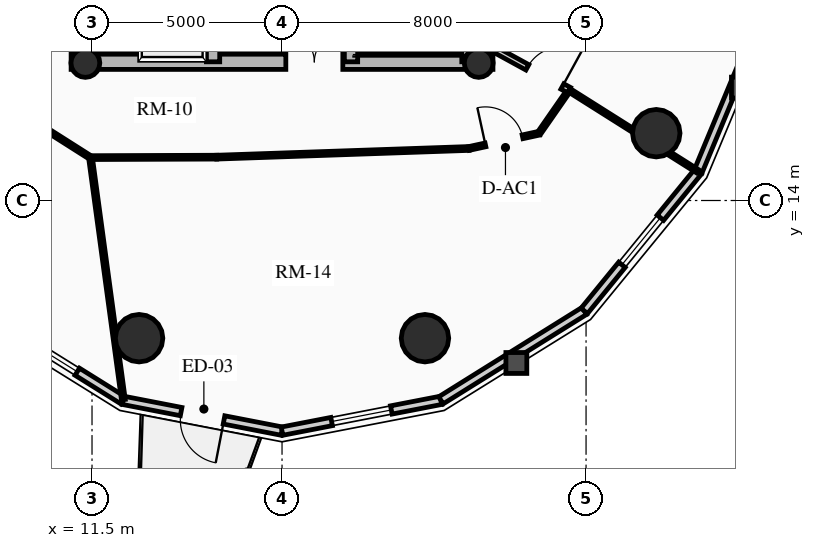
"""IFC4 building model, lengths in metres.
Left out: names, types, materials, properties, quantities, classifications, styles, units other than length and angle.
Written with IfcOpenShell. Run it as: python <this file> out.ifc"""

import sys

from ifc_helpers import new_model, si_unit, direction, frame, frame_2d, origin, origin_2d, place, context, subcontext, project, spatial, rectangle, circle, hollow_circle, extrude, source, transform, mapped, element, fill, save


model = new_model("IFC4")
c1 = context("Model", 3, precision=1e-05, world=origin(), true_north=direction((0.0, 1.0)))
c2 = subcontext(c1, "Body", "Model", "MODEL_VIEW")
j1 = project(units=[si_unit("LENGTHUNIT", "METRE"), si_unit("PLANEANGLEUNIT", "RADIAN")], contexts=[c1])
p1 = place(None, origin())
s1 = spatial("IfcSite", under=j1, at=p1, CompositionType="ELEMENT")
p2 = place(p1, origin())
s2 = spatial("IfcBuilding", under=s1, at=p2, CompositionType="ELEMENT")
p3 = place(p2, frame((0.0, 0.0, 189.43)))
s3 = spatial("IfcBuildingStorey", under=s2, at=p3, CompositionType="ELEMENT", Elevation=189.43)
for number, where, z_axis, x_axis in (
    (1, (11.15, 17.45, 0.0), (0.0, 0.0, 1.0), (0.0, 1.0, 0.0)),
    (2, (21.85, 17.45, 0.0), (0.0, 0.0, 1.0), (0.0, 1.0, 0.0)),
):
    element("IfcWall", number, at=place(p3, frame(where, z_axis=z_axis, x_axis=x_axis)), inside=s3, PredefinedType="SHEAR", context=c2, shape_type="SweptSolid", body=[
        extrude(rectangle(XDim=14.1, YDim=0.4, at=frame_2d((7.05, 0.0))), origin(), (0.0, 0.0, 1.0), 2.91),
    ])
p4 = place(p3, frame((11.15, 17.65, 0.0), z_axis=(0.0, 0.0, 1.0), x_axis=(1.0, 0.0, 0.0)))
e3 = element("IfcWall", 3, at=p4, inside=s3, PredefinedType="SHEAR", context=c2, shape_type="SweptSolid", body=[
    extrude(rectangle(XDim=10.7, YDim=0.4, at=frame_2d((5.35, 0.0))), origin(), (0.0, 0.0, 1.0), 2.91),
])
m1 = source(origin(), c2, "Body", "SweptSolid", [
    extrude(rectangle(XDim=1.5, YDim=2.02, at=frame_2d((0.75, 1.01))), frame((0.0, 0.21, 0.0), z_axis=(0.0, -1.0, 0.0), x_axis=(1.0, 0.0, 0.0)), (0.0, 0.0, 1.0), 0.42),
])
p5 = place(p4, frame((5.45, 0.0, 0.0)))
e4 = element("IfcOpeningElement", 4, at=p5, cuts=e3, PredefinedType="OPENING", context=c2, shape_type="MappedRepresentation", body=[
    mapped(m1, transform((0.0, 0.0, 0.0), x_axis=(1.0, 0.0, 0.0), y_axis=(0.0, 1.0, 0.0), z_axis=(0.0, 0.0, 1.0), scale=1.0)),
])
p6 = place(p3, frame((14.685, 17.65, 0.0), z_axis=(0.0, 0.0, 1.0), x_axis=(0.0, 1.0, 0.0)))
e5 = element("IfcWall", 5, at=p6, inside=s3, PredefinedType="SHEAR", context=c2, shape_type="SweptSolid", body=[
    extrude(rectangle(XDim=13.7, YDim=0.35, at=frame_2d((6.85, 0.0))), origin(), (0.0, 0.0, 1.0), 2.91),
])
m2 = source(origin(), c2, "Body", "SweptSolid", [
    extrude(rectangle(XDim=1.1, YDim=2.015, at=frame_2d((0.55, 1.007))), frame((0.0, 0.185, 0.0), z_axis=(0.0, -1.0, 0.0), x_axis=(1.0, 0.0, 0.0)), (0.0, 0.0, 1.0), 0.37),
])
p7 = place(p6, frame((4.85, 0.0, 0.0)))
e6 = element("IfcOpeningElement", 6, at=p7, cuts=e5, PredefinedType="OPENING", context=c2, shape_type="MappedRepresentation", body=[
    mapped(m2, transform((0.0, 0.0, 0.0), x_axis=(1.0, 0.0, 0.0), y_axis=(0.0, 1.0, 0.0), z_axis=(0.0, 0.0, 1.0), scale=1.0)),
])
p8 = place(p6, frame((0.625, 0.0, 0.0)))
e7 = element("IfcOpeningElement", 7, at=p8, cuts=e5, PredefinedType="OPENING", context=c2, shape_type="MappedRepresentation", body=[
    mapped(m2, transform((0.0, 0.0, 0.0), x_axis=(1.0, 0.0, 0.0), y_axis=(0.0, 1.0, 0.0), z_axis=(0.0, 0.0, 1.0), scale=1.0)),
])
p9 = place(p6, frame((2.625, 0.0, 0.0)))
e8 = element("IfcOpeningElement", 8, at=p9, cuts=e5, PredefinedType="OPENING", context=c2, shape_type="MappedRepresentation", body=[
    mapped(m2, transform((0.0, 0.0, 0.0), x_axis=(1.0, 0.0, 0.0), y_axis=(0.0, 1.0, 0.0), z_axis=(0.0, 0.0, 1.0), scale=1.0)),
])
m3 = source(origin(), c2, "Body", "SweptSolid", [
    extrude(rectangle(XDim=1.15, YDim=2.02, at=frame_2d((0.575, 1.01))), frame((0.0, 0.185, 0.0), z_axis=(0.0, -1.0, 0.0), x_axis=(1.0, 0.0, 0.0)), (0.0, 0.0, 1.0), 0.37),
])
p10 = place(p6, frame((7.27, 0.0, 0.0)))
e9 = element("IfcOpeningElement", 9, at=p10, cuts=e5, PredefinedType="OPENING", context=c2, shape_type="MappedRepresentation", body=[
    mapped(m3, transform((0.0, 0.0, 0.0), x_axis=(1.0, 0.0, 0.0), y_axis=(0.0, 1.0, 0.0), z_axis=(0.0, 0.0, 1.0), scale=1.0)),
])
p11 = place(p3, frame((18.315, 17.65, 0.0), z_axis=(0.0, 0.0, 1.0), x_axis=(0.0, 1.0, 0.0)))
e10 = element("IfcWall", 10, at=p11, inside=s3, PredefinedType="SHEAR", context=c2, shape_type="SweptSolid", body=[
    extrude(rectangle(XDim=9.6, YDim=0.35, at=frame_2d((4.8, 0.0))), origin(), (0.0, 0.0, 1.0), 2.91),
])
p12 = place(p11, frame((5.28, 0.0, 0.0)))
e11 = element("IfcOpeningElement", 11, at=p12, cuts=e10, PredefinedType="OPENING", context=c2, shape_type="MappedRepresentation", body=[
    mapped(m3, transform((0.0, 0.0, 0.0), x_axis=(1.0, 0.0, 0.0), y_axis=(0.0, 1.0, 0.0), z_axis=(0.0, 0.0, 1.0), scale=1.0)),
])
p13 = place(p3, frame((21.405, 17.65, 0.0), z_axis=(0.0, 0.0, 1.0), x_axis=(0.0, 1.0, 0.0)))
e12 = element("IfcWall", 12, at=p13, inside=s3, PredefinedType="SHEAR", context=c2, shape_type="SweptSolid", body=[
    extrude(rectangle(XDim=6.695, YDim=0.35, at=frame_2d((3.348, 0.0))), origin(), (0.0, 0.0, 1.0), 2.91),
])
for number, where, z_axis, x_axis in (
    (13, (11.325, 17.62, 0.0), (0.0, 0.0, 1.0), (1.0, 0.0, 0.0)),
    (14, (21.675, 17.62, 0.0), (0.0, 0.0, 1.0), (1.0, 0.0, 0.0)),
):
    element("IfcColumn", number, at=place(p3, frame(where, z_axis=z_axis, x_axis=x_axis)), inside=s3, PredefinedType="COLUMN", context=c2, shape_type="SweptSolid", body=[
        extrude(hollow_circle(Radius=0.38, WallThickness=0.032, at=origin_2d()), origin(), (0.0, 0.0, 1.0), 2.91),
    ])
for number, where, z_axis, x_axis in (
    (15, (12.739, 10.377, 0.0), (0.0, 0.0, 1.0), (1.0, 0.0, 0.0)),
    (16, (20.261, 10.377, 0.0), (0.0, 0.0, 1.0), (1.0, 0.0, 0.0)),
    (17, (26.347, 15.771, 0.0), (0.0, 0.0, 1.0), (1.0, 0.0, 0.0)),
):
    element("IfcColumn", number, at=place(p3, frame(where, z_axis=z_axis, x_axis=x_axis)), inside=s3, PredefinedType="USERDEFINED", context=c2, shape_type="SweptSolid", body=[
        extrude(circle(Radius=0.625, at=origin_2d()), origin(), (0.0, 0.0, 1.0), 2.91),
    ])
p14 = place(p3, frame((12.319, 8.741, 0.0), z_axis=(0.0, 0.0, 1.0), x_axis=(-0.848399108042, 0.529357113368, 0.0)))
e18 = element("IfcWall", 18, at=p14, inside=s3, PredefinedType="SOLIDWALL", context=c2, shape_type="SweptSolid", body=[
    extrude(rectangle(XDim=4.446, YDim=0.22, at=frame_2d((2.223, 0.0))), origin(), (0.0, 0.0, 1.0), 2.125),
])
m4 = source(origin(), c2, "Body", "SweptSolid", [
    extrude(rectangle(XDim=1.6, YDim=1.3, at=frame_2d((0.8, 0.65))), frame((0.0, 0.12, 0.0), z_axis=(0.0, -1.0, 0.0), x_axis=(1.0, 0.0, 0.0)), (0.0, 0.0, 1.0), 0.24),
])
p15 = place(p14, frame((1.423, 0.0, 0.65)))
e19 = element("IfcOpeningElement", 19, at=p15, cuts=e18, PredefinedType="OPENING", context=c2, shape_type="MappedRepresentation", body=[
    mapped(m4, transform((0.0, 0.0, 0.0), x_axis=(1.0, 0.0, 0.0), y_axis=(0.0, 1.0, 0.0), z_axis=(0.0, 0.0, 1.0), scale=1.0)),
])
p16 = place(p3, frame((16.5, 7.93, 0.0), z_axis=(0.0, 0.0, 1.0), x_axis=(-0.981703883443, 0.190413983815, 0.0)))
e20 = element("IfcWall", 20, at=p16, inside=s3, PredefinedType="SOLIDWALL", context=c2, shape_type="SweptSolid", body=[
    extrude(rectangle(XDim=4.259, YDim=0.22, at=frame_2d((2.13, 0.0))), origin(), (0.0, 0.0, 1.0), 2.125),
])
m5 = source(origin(), c2, "Body", "SweptSolid", [
    extrude(rectangle(XDim=1.15, YDim=2.005, at=frame_2d((0.575, 1.002))), frame((0.0, 0.12, 0.0), z_axis=(0.0, -1.0, 0.0), x_axis=(1.0, 0.0, 0.0)), (0.0, 0.0, 1.0), 0.24),
])
p17 = place(p16, frame((1.555, 0.0, 0.0)))
e21 = element("IfcOpeningElement", 21, at=p17, cuts=e20, PredefinedType="OPENING", context=c2, shape_type="MappedRepresentation", body=[
    mapped(m5, transform((0.0, 0.0, 0.0), x_axis=(1.0, 0.0, 0.0), y_axis=(0.0, 1.0, 0.0), z_axis=(0.0, 0.0, 1.0), scale=1.0)),
])
p18 = place(p3, frame((20.681, 8.741, 0.0), z_axis=(0.0, 0.0, 1.0), x_axis=(-0.981703883443, -0.190413983815, 0.0)))
e22 = element("IfcWall", 22, at=p18, inside=s3, PredefinedType="SOLIDWALL", context=c2, shape_type="SweptSolid", body=[
    extrude(rectangle(XDim=4.259, YDim=0.22, at=frame_2d((2.13, 0.0))), origin(), (0.0, 0.0, 1.0), 2.125),
])
p19 = place(p18, frame((1.33, 0.0, 0.65)))
e23 = element("IfcOpeningElement", 23, at=p19, cuts=e22, PredefinedType="OPENING", context=c2, shape_type="MappedRepresentation", body=[
    mapped(m4, transform((0.0, 0.0, 0.0), x_axis=(1.0, 0.0, 0.0), y_axis=(0.0, 1.0, 0.0), z_axis=(0.0, 0.0, 1.0), scale=1.0)),
])
p20 = place(p3, frame((24.453, 11.094, 0.0), z_axis=(0.0, 0.0, 1.0), x_axis=(-0.848399108042, -0.529357113368, 0.0)))
e24 = element("IfcWall", 24, at=p20, inside=s3, PredefinedType="SOLIDWALL", context=c2, shape_type="SweptSolid", body=[
    extrude(rectangle(XDim=4.446, YDim=0.22, at=frame_2d((2.223, 0.0))), origin(), (0.0, 0.0, 1.0), 2.125),
])
p21 = place(p3, frame((27.447, 14.76, 0.0), z_axis=(0.0, 0.0, 1.0), x_axis=(-0.632470615287, -0.774584353572, 0.0)))
e25 = element("IfcWall", 25, at=p21, inside=s3, PredefinedType="SOLIDWALL", context=c2, shape_type="SweptSolid", body=[
    extrude(rectangle(XDim=4.733, YDim=0.22, at=frame_2d((2.366, 0.0))), origin(), (0.0, 0.0, 1.0), 2.125),
])
p22 = place(p21, frame((1.566, 0.0, 0.65)))
e26 = element("IfcOpeningElement", 26, at=p22, cuts=e25, PredefinedType="OPENING", context=c2, shape_type="MappedRepresentation", body=[
    mapped(m4, transform((0.0, 0.0, 0.0), x_axis=(1.0, 0.0, 0.0), y_axis=(0.0, 1.0, 0.0), z_axis=(0.0, 0.0, 1.0), scale=1.0)),
])
p23 = place(p3, frame((29.369, 19.38, 0.0), z_axis=(0.0, 0.0, 1.0), x_axis=(-0.384144094086, -0.923273152961, 0.0)))
e27 = element("IfcWall", 27, at=p23, inside=s3, PredefinedType="SOLIDWALL", context=c2, shape_type="SweptSolid", body=[
    extrude(rectangle(XDim=5.003, YDim=0.22, at=frame_2d((2.501, 0.0))), origin(), (0.0, 0.0, 1.0), 2.125),
])
p24 = place(p3, frame((10.115, 15.983, 0.0), z_axis=(0.0, 0.0, 1.0), x_axis=(0.843995849351, -0.536349705209, 0.0)))
e28 = element("IfcWall", 28, at=p24, inside=s3, PredefinedType="MOVABLE", context=c2, shape_type="SweptSolid", body=[
    extrude(rectangle(XDim=1.593, YDim=0.1, at=frame_2d((0.796, 0.0))), origin(), (0.0, 0.0, 1.0), 2.125),
])
p25 = place(p3, frame((11.46, 15.129, 0.0), z_axis=(0.0, 0.0, 1.0), x_axis=(0.999993513287, 0.003601858435, 0.0)))
e29 = element("IfcWall", 29, at=p25, inside=s3, PredefinedType="MOVABLE", context=c2, shape_type="SweptSolid", body=[
    extrude(rectangle(XDim=3.321, YDim=0.1, at=frame_2d((1.661, 0.0))), origin(), (0.0, 0.0, 1.0), 2.125),
])
p26 = place(p3, frame((14.781, 15.141, 0.0), z_axis=(0.0, 0.0, 1.0), x_axis=(0.999407918707, 0.034406569513, 0.0)))
e30 = element("IfcWall", 30, at=p26, inside=s3, PredefinedType="MOVABLE", context=c2, shape_type="SweptSolid", body=[
    extrude(rectangle(XDim=6.642, YDim=0.1, at=frame_2d((3.321, 0.0))), origin(), (0.0, 0.0, 1.0), 2.125),
])
p27 = place(p3, frame((21.419, 15.369, 0.0), z_axis=(0.0, 0.0, 1.0), x_axis=(0.977192701953, 0.212354475464, 0.0)))
e31 = element("IfcWall", 31, at=p27, inside=s3, PredefinedType="MOVABLE", context=c2, shape_type="SweptSolid", body=[
    extrude(rectangle(XDim=1.888, YDim=0.1, at=frame_2d((0.944, 0.0))), origin(), (0.0, 0.0, 1.0), 2.125),
])
m6 = source(origin(), c2, "Body", "SweptSolid", [
    extrude(rectangle(XDim=1.0, YDim=2.015, at=frame_2d((0.5, 1.007))), frame((0.0, 0.06, 0.0), z_axis=(0.0, -1.0, 0.0), x_axis=(1.0, 0.0, 0.0)), (0.0, 0.0, 1.0), 0.12),
])
p28 = place(p27, frame((0.444, 0.0, 0.0)))
e32 = element("IfcOpeningElement", 32, at=p28, cuts=e31, PredefinedType="OPENING", context=c2, shape_type="MappedRepresentation", body=[
    mapped(m6, transform((0.0, 0.0, 0.0), x_axis=(1.0, 0.0, 0.0), y_axis=(0.0, 1.0, 0.0), z_axis=(0.0, 0.0, 1.0), scale=1.0)),
])
p29 = place(p3, frame((23.263, 15.77, 0.0), z_axis=(0.0, 0.0, 1.0), x_axis=(0.570743456919, 0.821128434768, 0.0)))
e33 = element("IfcWall", 33, at=p29, inside=s3, PredefinedType="MOVABLE", context=c2, shape_type="SweptSolid", body=[
    extrude(rectangle(XDim=1.382, YDim=0.1, at=frame_2d((0.691, 0.0))), origin(), (0.0, 0.0, 1.0), 2.125),
])
p30 = place(p3, frame((11.46, 15.129, 0.0), z_axis=(0.0, 0.0, 1.0), x_axis=(0.134621607411, -0.990897079831, 0.0)))
e34 = element("IfcWall", 34, at=p30, inside=s3, PredefinedType="MOVABLE", context=c2, shape_type="SweptSolid", body=[
    extrude(rectangle(XDim=6.427, YDim=0.1, at=frame_2d((3.214, 0.0))), origin(), (0.0, 0.0, 1.0), 2.125),
])
p31 = place(p3, frame((24.052, 16.905, 0.0), z_axis=(0.0, 0.0, 1.0), x_axis=(0.845666007609, -0.533712472755, 0.0)))
e35 = element("IfcWall", 35, at=p31, inside=s3, PredefinedType="MOVABLE", context=c2, shape_type="SweptSolid", body=[
    extrude(rectangle(XDim=3.995, YDim=0.1, at=frame_2d((1.998, 0.0))), origin(), (0.0, 0.0, 1.0), 2.125),
])
p32 = place(p3, frame((22.05, 18.0, 0.0), z_axis=(0.0, 0.0, 1.0), x_axis=(0.877252891813, -0.480028503118, 0.0)))
e36 = element("IfcWall", 36, at=p32, inside=s3, PredefinedType="PARTITIONING", context=c2, shape_type="SweptSolid", body=[
    extrude(rectangle(XDim=2.282, YDim=0.16, at=frame_2d((1.141, 0.0))), origin(), (0.0, 0.0, 1.0), 2.125),
])
m7 = source(origin(), c2, "Body", "SweptSolid", [
    extrude(rectangle(XDim=1.05, YDim=2.015, at=frame_2d((0.525, 1.007))), frame((0.0, 0.09, 0.0), z_axis=(0.0, -1.0, 0.0), x_axis=(1.0, 0.0, 0.0)), (0.0, 0.0, 1.0), 0.18),
])
p33 = place(p32, frame((1.032, 0.0, 0.0)))
e37 = element("IfcOpeningElement", 37, at=p33, cuts=e36, PredefinedType="OPENING", context=c2, shape_type="MappedRepresentation", body=[
    mapped(m7, transform((0.0, 0.0, 0.0), x_axis=(1.0, 0.0, 0.0), y_axis=(0.0, 1.0, 0.0), z_axis=(0.0, 0.0, 1.0), scale=1.0)),
])
m8 = source(origin(), c2, "Body", "SweptSolid", [
    extrude(rectangle(XDim=1.6, YDim=1.3, at=frame_2d((0.8, 0.65))), frame((0.0, 0.03, 0.0), z_axis=(0.0, -1.0, 0.0), x_axis=(1.0, 0.0, 0.0)), (0.0, 0.0, 1.0), 0.06),
])
p34 = place(p15, origin())
e38 = element("IfcWindow", 38, at=p34, inside=s3, PartitioningType="SINGLE_PANEL", PredefinedType="WINDOW", context=c2, shape_type="MappedRepresentation", body=[
    mapped(m8, transform((0.0, 0.0, 0.0), x_axis=(1.0, 0.0, 0.0), y_axis=(0.0, 1.0, 0.0), z_axis=(0.0, 0.0, 1.0), scale=1.0)),
])
fill(e19, e38)
m9 = source(origin(), c2, "Body", "SweptSolid", [
    extrude(rectangle(XDim=1.15, YDim=2.005, at=frame_2d((0.575, 1.002))), frame((0.0, 0.025, 0.0), z_axis=(0.0, -1.0, 0.0), x_axis=(1.0, 0.0, 0.0)), (0.0, 0.0, 1.0), 0.05),
])
p35 = place(p17, origin())
e39 = element("IfcDoor", 39, at=p35, inside=s3, OperationType="SINGLE_SWING_LEFT", PredefinedType="DOOR", context=c2, shape_type="MappedRepresentation", body=[
    mapped(m9, transform((0.0, 0.0, 0.0), x_axis=(1.0, 0.0, 0.0), y_axis=(0.0, 1.0, 0.0), z_axis=(0.0, 0.0, 1.0), scale=1.0)),
])
fill(e21, e39)
p36 = place(p19, origin())
e40 = element("IfcWindow", 40, at=p36, inside=s3, PartitioningType="SINGLE_PANEL", PredefinedType="WINDOW", context=c2, shape_type="MappedRepresentation", body=[
    mapped(m8, transform((0.0, 0.0, 0.0), x_axis=(1.0, 0.0, 0.0), y_axis=(0.0, 1.0, 0.0), z_axis=(0.0, 0.0, 1.0), scale=1.0)),
])
fill(e23, e40)
p37 = place(p22, origin())
e41 = element("IfcWindow", 41, at=p37, inside=s3, PartitioningType="SINGLE_PANEL", PredefinedType="WINDOW", context=c2, shape_type="MappedRepresentation", body=[
    mapped(m8, transform((0.0, 0.0, 0.0), x_axis=(1.0, 0.0, 0.0), y_axis=(0.0, 1.0, 0.0), z_axis=(0.0, 0.0, 1.0), scale=1.0)),
])
fill(e26, e41)
m10 = source(origin(), c2, "Body", "SweptSolid", [
    extrude(rectangle(XDim=1.5, YDim=2.02, at=frame_2d((0.75, 1.01))), frame((0.0, 0.025, 0.0), z_axis=(0.0, -1.0, 0.0), x_axis=(1.0, 0.0, 0.0)), (0.0, 0.0, 1.0), 0.05),
])
p38 = place(p5, origin())
e42 = element("IfcDoor", 42, at=p38, inside=s3, OperationType="DOUBLE_DOOR_SINGLE_SWING", PredefinedType="DOOR", context=c2, shape_type="MappedRepresentation", body=[
    mapped(m10, transform((0.0, 0.0, 0.0), x_axis=(1.0, 0.0, 0.0), y_axis=(0.0, 1.0, 0.0), z_axis=(0.0, 0.0, 1.0), scale=1.0)),
])
fill(e4, e42)
m11 = source(origin(), c2, "Body", "SweptSolid", [
    extrude(rectangle(XDim=1.05, YDim=2.015, at=frame_2d((0.525, 1.007))), frame((0.0, 0.025, 0.0), z_axis=(0.0, -1.0, 0.0), x_axis=(1.0, 0.0, 0.0)), (0.0, 0.0, 1.0), 0.05),
])
p39 = place(p33, origin())
e43 = element("IfcDoor", 43, at=p39, inside=s3, OperationType="SINGLE_SWING_RIGHT", PredefinedType="DOOR", context=c2, shape_type="MappedRepresentation", body=[
    mapped(m11, transform((0.0, 0.0, 0.0), x_axis=(1.0, 0.0, 0.0), y_axis=(0.0, 1.0, 0.0), z_axis=(0.0, 0.0, 1.0), scale=1.0)),
])
fill(e37, e43)
m12 = source(origin(), c2, "Body", "SweptSolid", [
    extrude(rectangle(XDim=1.0, YDim=2.015, at=frame_2d((0.5, 1.007))), frame((0.0, 0.025, 0.0), z_axis=(0.0, -1.0, 0.0), x_axis=(1.0, 0.0, 0.0)), (0.0, 0.0, 1.0), 0.05),
])
p40 = place(p28, origin())
e44 = element("IfcDoor", 44, at=p40, inside=s3, OperationType="SINGLE_SWING_LEFT", PredefinedType="DOOR", context=c2, shape_type="MappedRepresentation", body=[
    mapped(m12, transform((0.0, 0.0, 0.0), x_axis=(1.0, 0.0, 0.0), y_axis=(0.0, 1.0, 0.0), z_axis=(0.0, 0.0, 1.0), scale=1.0)),
])
fill(e32, e44)
save(model, sys.argv[1])
